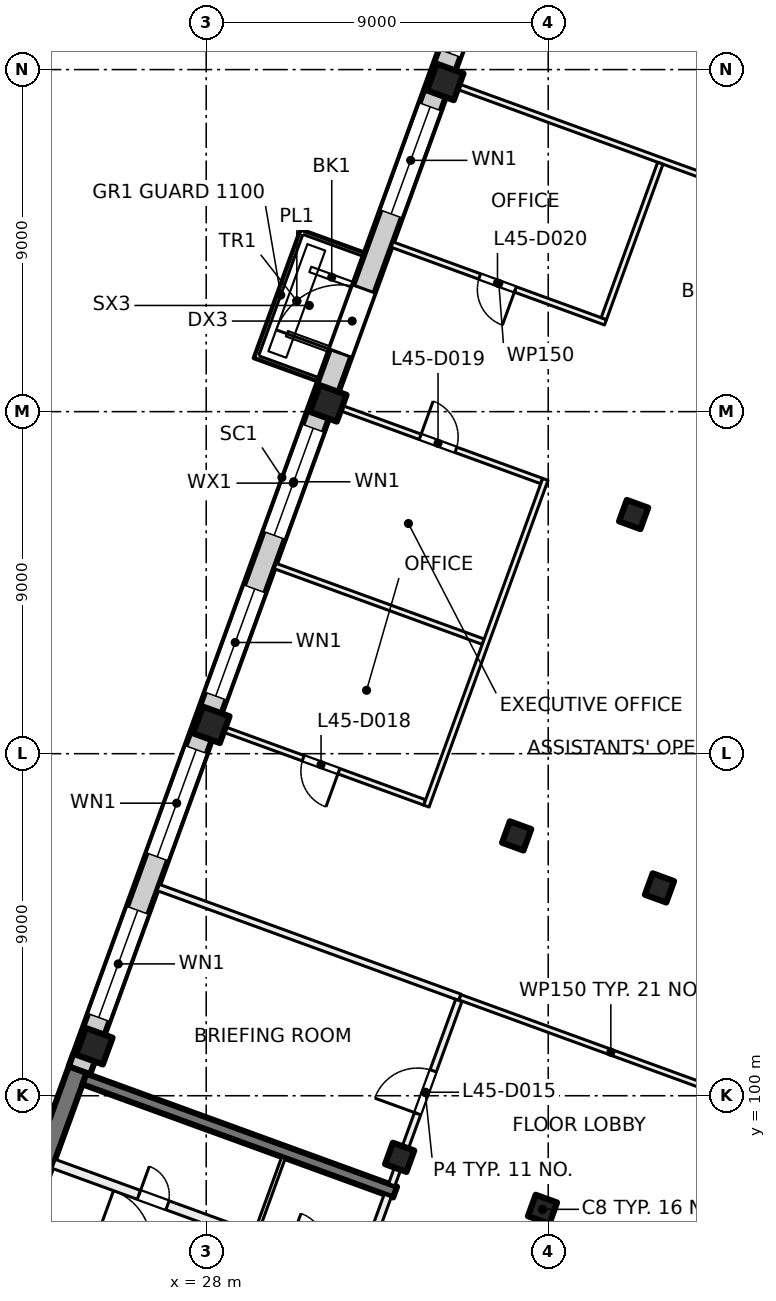
"""IFC4 building model, lengths in metres.
Left out: names, types, materials, properties, quantities, classifications, styles, units other than length and angle.
Written with IfcOpenShell. Run it as: python <this file> out.ifc"""

import sys

from ifc_helpers import new_model, si_unit, direction, frame, frame_2d, origin, origin_2d, place, context, subcontext, project, spatial, rectangle, extrude, element, fill, save


model = new_model("IFC4")
c1 = context("Model", 3, precision=1e-05, world=origin(), true_north=direction((0.0, 1.0)))
c2 = subcontext(c1, "Body", "Model", "MODEL_VIEW")
j1 = project(units=[si_unit("LENGTHUNIT", "METRE"), si_unit("PLANEANGLEUNIT", "RADIAN")], contexts=[c1])
p1 = place(None, origin())
s1 = spatial("IfcSite", under=j1, at=p1, CompositionType="ELEMENT")
p2 = place(p1, origin())
s2 = spatial("IfcBuilding", under=s1, at=p2, CompositionType="ELEMENT")
p3 = place(p2, frame((0.0, 0.0, 192.0)))
s3 = spatial("IfcBuildingStorey", under=s2, at=p3, CompositionType="ELEMENT", Elevation=192.0)
for number, where, z_axis, x_axis in (
    (1, (39.927, 105.468, 0.0), (0.0, 0.0, 1.0), (-0.342, -0.94, 0.0)),
    (2, (36.849, 97.011, 0.0), (0.0, 0.0, 1.0), (-0.342, -0.94, 0.0)),
    (3, (39.247, 115.293, 0.0), (0.0, 0.0, 1.0), (-0.342, -0.94, 0.0)),
    (4, (36.169, 106.836, 0.0), (0.0, 0.0, 1.0), (-0.342, -0.94, 0.0)),
    (5, (33.091, 98.379, 0.0), (0.0, 0.0, 1.0), (-0.342, -0.94, 0.0)),
):
    element("IfcColumn", number, at=place(p3, frame(where, z_axis=z_axis, x_axis=x_axis)), inside=s3, PredefinedType="COLUMN", context=c2, shape_type="SweptSolid", body=[
        extrude(rectangle(XDim=0.6, YDim=0.6, at=origin_2d()), origin(), (0.0, 0.0, 1.0), 4.0),
    ])
for number, where, z_axis, x_axis in (
    (6, (34.291, 126.675, 0.0), (0.0, 0.0, 1.0), (-0.342, -0.94, 0.0)),
    (7, (31.212, 118.218, 0.0), (0.0, 0.0, 1.0), (-0.342, -0.94, 0.0)),
    (8, (28.134, 109.76, 0.0), (0.0, 0.0, 1.0), (-0.342, -0.94, 0.0)),
    (9, (25.056, 101.303, 0.0), (0.0, 0.0, 1.0), (-0.342, -0.94, 0.0)),
):
    element("IfcColumn", number, at=place(p3, frame(where, z_axis=z_axis, x_axis=x_axis)), inside=s3, PredefinedType="COLUMN", context=c2, shape_type="SweptSolid", body=[
        extrude(rectangle(XDim=0.75, YDim=0.75, at=origin_2d()), origin(), (0.0, 0.0, 1.0), 4.0),
    ])
p4 = place(p3, frame((21.67, 92.585, 0.0), z_axis=(0.0, 0.0, 1.0), x_axis=(0.342035714298, 0.93968695327, 0.0)))
e10 = element("IfcWall", 10, at=p4, inside=s3, PredefinedType="SHEAR", context=c2, shape_type="SweptSolid", body=[
    extrude(rectangle(XDim=8.975, YDim=0.5, at=frame_2d((4.488, 0.0))), origin(), (0.0, 0.0, 1.0), 4.0),
])
p5 = place(p3, frame((32.971, 97.465, 0.0), z_axis=(0.0, 0.0, 1.0), x_axis=(-0.939695066972, 0.34201342241, 0.0)))
e11 = element("IfcWall", 11, at=p5, inside=s3, PredefinedType="SHEAR", context=c2, shape_type="SweptSolid", body=[
    extrude(rectangle(XDim=8.7, YDim=0.3, at=frame_2d((4.35, 0.0))), origin(), (0.0, 0.0, 1.0), 4.0),
])
p6 = place(p3, frame((24.666, 100.669, 0.0), z_axis=(0.0, 0.0, 1.0), x_axis=(0.34201964167, 0.939692803373, 0.0)))
e12 = element("IfcWall", 12, at=p6, inside=s3, PredefinedType="SOLIDWALL", context=c2, shape_type="SweptSolid", body=[
    extrude(rectangle(XDim=32.884, YDim=0.6, at=frame_2d((16.442, 0.0))), origin(), (0.0, 0.0, 1.0), 3.625),
])
p7 = place(p6, frame((1.48, 0.0, 0.9)))
e13 = element("IfcOpeningElement", 13, at=p7, cuts=e12, PredefinedType="OPENING", context=c2, shape_type="SweptSolid", body=[
    extrude(rectangle(XDim=3.0, YDim=2.4, at=frame_2d((1.5, 1.2))), frame((0.0, 0.31, 0.0), z_axis=(0.0, -1.0, 0.0), x_axis=(1.0, 0.0, 0.0)), (0.0, 0.0, 1.0), 0.62),
])
p8 = place(p6, frame((5.98, 0.0, 0.9)))
e14 = element("IfcOpeningElement", 14, at=p8, cuts=e12, PredefinedType="OPENING", context=c2, shape_type="SweptSolid", body=[
    extrude(rectangle(XDim=3.0, YDim=2.4, at=frame_2d((1.5, 1.2))), frame((0.0, 0.31, 0.0), z_axis=(0.0, -1.0, 0.0), x_axis=(1.0, 0.0, 0.0)), (0.0, 0.0, 1.0), 0.62),
])
p9 = place(p6, frame((10.48, 0.0, 0.9)))
e15 = element("IfcOpeningElement", 15, at=p9, cuts=e12, PredefinedType="OPENING", context=c2, shape_type="SweptSolid", body=[
    extrude(rectangle(XDim=3.0, YDim=2.4, at=frame_2d((1.5, 1.2))), frame((0.0, 0.31, 0.0), z_axis=(0.0, -1.0, 0.0), x_axis=(1.0, 0.0, 0.0)), (0.0, 0.0, 1.0), 0.62),
])
p10 = place(p6, frame((14.98, 0.0, 0.9)))
e16 = element("IfcOpeningElement", 16, at=p10, cuts=e12, PredefinedType="OPENING", context=c2, shape_type="SweptSolid", body=[
    extrude(rectangle(XDim=3.0, YDim=2.4, at=frame_2d((1.5, 1.2))), frame((0.0, 0.31, 0.0), z_axis=(0.0, -1.0, 0.0), x_axis=(1.0, 0.0, 0.0)), (0.0, 0.0, 1.0), 0.62),
])
p11 = place(p6, frame((20.08, 0.0, 0.0)))
e17 = element("IfcOpeningElement", 17, at=p11, cuts=e12, PredefinedType="OPENING", context=c2, shape_type="SweptSolid", body=[
    extrude(rectangle(XDim=1.8, YDim=2.4, at=frame_2d((0.9, 1.2))), frame((0.0, 0.31, 0.0), z_axis=(0.0, -1.0, 0.0), x_axis=(1.0, 0.0, 0.0)), (0.0, 0.0, 1.0), 0.62),
])
p12 = place(p6, frame((23.98, 0.0, 0.9)))
e18 = element("IfcOpeningElement", 18, at=p12, cuts=e12, PredefinedType="OPENING", context=c2, shape_type="SweptSolid", body=[
    extrude(rectangle(XDim=3.0, YDim=2.4, at=frame_2d((1.5, 1.2))), frame((0.0, 0.31, 0.0), z_axis=(0.0, -1.0, 0.0), x_axis=(1.0, 0.0, 0.0)), (0.0, 0.0, 1.0), 0.62),
])
p13 = place(p6, frame((28.48, 0.0, 0.9)))
e19 = element("IfcOpeningElement", 19, at=p13, cuts=e12, PredefinedType="OPENING", context=c2, shape_type="SweptSolid", body=[
    extrude(rectangle(XDim=3.0, YDim=2.4, at=frame_2d((1.5, 1.2))), frame((0.0, 0.31, 0.0), z_axis=(0.0, -1.0, 0.0), x_axis=(1.0, 0.0, 0.0)), (0.0, 0.0, 1.0), 0.62),
])
p14 = place(p3, frame((31.427, 93.663, 0.0), z_axis=(0.0, 0.0, 1.0), x_axis=(0.342030870568, 0.93968871632, 0.0)))
e20 = element("IfcWall", 20, at=p14, inside=s3, PredefinedType="PARTITIONING", context=c2, shape_type="SweptSolid", body=[
    extrude(rectangle(XDim=3.95, YDim=0.2, at=frame_2d((1.975, 0.0))), origin(), (0.0, 0.0, 1.0), 3.625),
])
p15 = place(p14, frame((0.3, 0.0, 0.0)))
e21 = element("IfcOpeningElement", 21, at=p15, cuts=e20, PredefinedType="OPENING", context=c2, shape_type="SweptSolid", body=[
    extrude(rectangle(XDim=1.2, YDim=2.1, at=frame_2d((0.6, 1.05))), frame((0.0, 0.11, 0.0), z_axis=(0.0, -1.0, 0.0), x_axis=(1.0, 0.0, 0.0)), (0.0, 0.0, 1.0), 0.22),
])
p16 = place(p3, frame((23.427, 96.682, 0.0), z_axis=(0.0, 0.0, 1.0), x_axis=(0.939690465531, -0.342026064782, 0.0)))
e22 = element("IfcWall", 22, at=p16, inside=s3, PredefinedType="PARTITIONING", context=c2, shape_type="SweptSolid", body=[
    extrude(rectangle(XDim=8.45, YDim=0.2, at=frame_2d((4.225, 0.0))), origin(), (0.0, 0.0, 1.0), 3.625),
])
p17 = place(p16, frame((1.725, 0.0, 0.0)))
e23 = element("IfcOpeningElement", 23, at=p17, cuts=e22, PredefinedType="OPENING", context=c2, shape_type="SweptSolid", body=[
    extrude(rectangle(XDim=1.5, YDim=2.1, at=frame_2d((0.75, 1.05))), frame((0.0, 0.11, 0.0), z_axis=(0.0, -1.0, 0.0), x_axis=(1.0, 0.0, 0.0)), (0.0, 0.0, 1.0), 0.22),
])
p18 = place(p3, frame((23.983, 98.208, 0.0), z_axis=(0.0, 0.0, 1.0), x_axis=(0.939699751196, -0.342000552051, 0.0)))
e24 = element("IfcWall", 24, at=p18, inside=s3, PredefinedType="PARTITIONING", context=c2, shape_type="SweptSolid", body=[
    extrude(rectangle(XDim=8.45, YDim=0.25, at=frame_2d((4.225, 0.0))), origin(), (0.0, 0.0, 1.0), 3.625),
])
p19 = place(p18, frame((6.565, 0.0, 0.0)))
e25 = element("IfcOpeningElement", 25, at=p19, cuts=e24, PredefinedType="OPENING", context=c2, shape_type="SweptSolid", body=[
    extrude(rectangle(XDim=1.0, YDim=2.1, at=frame_2d((0.5, 1.05))), frame((0.0, 0.135, 0.0), z_axis=(0.0, -1.0, 0.0), x_axis=(1.0, 0.0, 0.0)), (0.0, 0.0, 1.0), 0.27),
])
p20 = place(p18, frame((2.39, 0.0, 0.0)))
e26 = element("IfcOpeningElement", 26, at=p20, cuts=e24, PredefinedType="OPENING", context=c2, shape_type="SweptSolid", body=[
    extrude(rectangle(XDim=0.8, YDim=2.1, at=frame_2d((0.4, 1.05))), frame((0.0, 0.135, 0.0), z_axis=(0.0, -1.0, 0.0), x_axis=(1.0, 0.0, 0.0)), (0.0, 0.0, 1.0), 0.27),
])
p21 = place(p3, frame((29.316, 96.4, 0.0), z_axis=(0.0, 0.0, 1.0), x_axis=(0.342023078919, 0.939691552312, 0.0)))
e27 = element("IfcWall", 27, at=p21, inside=s3, PredefinedType="PARTITIONING", context=c2, shape_type="SweptSolid", body=[
    extrude(rectangle(XDim=2.1, YDim=0.1, at=frame_2d((1.05, 0.0))), origin(), (0.0, 0.0, 1.0), 3.625),
])
p22 = place(p3, frame((26.736, 105.48, 0.0), z_axis=(0.0, 0.0, 1.0), x_axis=(0.939706509432, -0.341981982173, 0.0)))
e28 = element("IfcWall", 28, at=p22, inside=s3, PredefinedType="PARTITIONING", context=c2, shape_type="SweptSolid", body=[
    extrude(rectangle(XDim=8.45, YDim=0.175, at=frame_2d((4.225, 0.0))), origin(), (0.0, 0.0, 1.0), 3.625),
])
p23 = place(p3, frame((29.814, 113.938, 0.0), z_axis=(0.0, 0.0, 1.0), x_axis=(0.939738354986, -0.341894463495, 0.0)))
e29 = element("IfcWall", 29, at=p23, inside=s3, PredefinedType="PARTITIONING", context=c2, shape_type="SweptSolid", body=[
    extrude(rectangle(XDim=5.826, YDim=0.15, at=frame_2d((2.913, 0.0))), origin(), (0.0, 0.0, 1.0), 3.625),
])
p24 = place(p3, frame((31.353, 118.166, 0.0), z_axis=(0.0, 0.0, 1.0), x_axis=(0.939733456466, -0.341907927371, 0.0)))
e30 = element("IfcWall", 30, at=p24, inside=s3, PredefinedType="PARTITIONING", context=c2, shape_type="SweptSolid", body=[
    extrude(rectangle(XDim=5.826, YDim=0.15, at=frame_2d((2.913, 0.0))), origin(), (0.0, 0.0, 1.0), 3.625),
])
p25 = place(p24, frame((2.423, 0.0, 0.0)))
e31 = element("IfcOpeningElement", 31, at=p25, cuts=e30, PredefinedType="OPENING", context=c2, shape_type="SweptSolid", body=[
    extrude(rectangle(XDim=1.0, YDim=2.1, at=frame_2d((0.5, 1.05))), frame((0.0, 0.085, 0.0), z_axis=(0.0, -1.0, 0.0), x_axis=(1.0, 0.0, 0.0)), (0.0, 0.0, 1.0), 0.17),
])
p26 = place(p3, frame((33.749, 107.717, 0.0), z_axis=(0.0, 0.0, 1.0), x_axis=(-0.939718757431, 0.341948324943, 0.0)))
e32 = element("IfcWall", 32, at=p26, inside=s3, PredefinedType="PARTITIONING", context=c2, shape_type="SweptSolid", body=[
    extrude(rectangle(XDim=5.825, YDim=0.15, at=frame_2d((2.913, 0.0))), origin(), (0.0, 0.0, 1.0), 3.625),
])
p27 = place(p26, frame((2.403, 0.0, 0.0)))
e33 = element("IfcOpeningElement", 33, at=p27, cuts=e32, PredefinedType="OPENING", context=c2, shape_type="SweptSolid", body=[
    extrude(rectangle(XDim=1.0, YDim=2.1, at=frame_2d((0.5, 1.05))), frame((0.0, 0.085, 0.0), z_axis=(0.0, -1.0, 0.0), x_axis=(1.0, 0.0, 0.0)), (0.0, 0.0, 1.0), 0.17),
])
p28 = place(p3, frame((36.924, 116.218, 0.0), z_axis=(0.0, 0.0, 1.0), x_axis=(-0.342220796767, -0.939619564643, 0.0)))
e34 = element("IfcWall", 34, at=p28, inside=s3, PredefinedType="PARTITIONING", context=c2, shape_type="SweptSolid", body=[
    extrude(rectangle(XDim=9.149, YDim=0.15, at=frame_2d((4.575, 0.0))), origin(), (0.0, 0.0, 1.0), 3.625),
])
p29 = place(p3, frame((34.431, 126.624, 0.0), z_axis=(0.0, 0.0, 1.0), x_axis=(0.939703144457, -0.341991228392, 0.0)))
e35 = element("IfcWall", 35, at=p29, inside=s3, PredefinedType="PARTITIONING", context=c2, shape_type="SweptSolid", body=[
    extrude(rectangle(XDim=12.401, YDim=0.15, at=frame_2d((6.2, 0.0))), origin(), (0.0, 0.0, 1.0), 3.625),
])
p30 = place(p3, frame((32.881, 97.657, 0.0), z_axis=(0.0, 0.0, 1.0), x_axis=(0.342058204353, 0.939678766832, 0.0)))
e36 = element("IfcWall", 36, at=p30, inside=s3, PredefinedType="PARTITIONING", context=c2, shape_type="SweptSolid", body=[
    extrude(rectangle(XDim=5.163, YDim=0.175, at=frame_2d((2.581, 0.0))), origin(), (0.0, 0.0, 1.0), 3.625),
])
p31 = place(p30, frame((1.991, 0.0, 0.0)))
e37 = element("IfcOpeningElement", 37, at=p31, cuts=e36, PredefinedType="OPENING", context=c2, shape_type="SweptSolid", body=[
    extrude(rectangle(XDim=1.2, YDim=2.1, at=frame_2d((0.6, 1.05))), frame((0.0, 0.097, 0.0), z_axis=(0.0, -1.0, 0.0), x_axis=(1.0, 0.0, 0.0)), (0.0, 0.0, 1.0), 0.195),
])
p32 = place(p3, frame((34.677, 102.59, 0.0), z_axis=(0.0, 0.0, 1.0), x_axis=(0.939683705252, -0.342044637561, 0.0)))
e38 = element("IfcWall", 38, at=p32, inside=s3, PredefinedType="PARTITIONING", context=c2, shape_type="SweptSolid", body=[
    extrude(rectangle(XDim=8.45, YDim=0.15, at=frame_2d((4.225, 0.0))), origin(), (0.0, 0.0, 1.0), 3.625),
])
p33 = place(p3, frame((38.507, 120.351, 0.0), z_axis=(0.0, 0.0, 1.0), x_axis=(-0.939678850769, 0.342057973766, 0.0)))
e39 = element("IfcWall", 39, at=p33, inside=s3, PredefinedType="PARTITIONING", context=c2, shape_type="SweptSolid", body=[
    extrude(rectangle(XDim=5.975, YDim=0.15, at=frame_2d((2.988, 0.0))), origin(), (0.0, 0.0, 1.0), 3.625),
])
p34 = place(p33, frame((2.525, 0.0, 0.0)))
e40 = element("IfcOpeningElement", 40, at=p34, cuts=e39, PredefinedType="OPENING", context=c2, shape_type="SweptSolid", body=[
    extrude(rectangle(XDim=1.0, YDim=2.1, at=frame_2d((0.5, 1.05))), frame((0.0, 0.085, 0.0), z_axis=(0.0, -1.0, 0.0), x_axis=(1.0, 0.0, 0.0)), (0.0, 0.0, 1.0), 0.17),
])
p35 = place(p3, frame((39.95, 124.536, 0.0), z_axis=(0.0, 0.0, 1.0), x_axis=(-0.341783611499, -0.939778677621, 0.0)))
e41 = element("IfcWall", 41, at=p35, inside=s3, PredefinedType="PARTITIONING", context=c2, shape_type="SweptSolid", body=[
    extrude(rectangle(XDim=4.351, YDim=0.15, at=frame_2d((2.175, 0.0))), origin(), (0.0, 0.0, 1.0), 3.625),
])
p36 = place(p7, origin())
e42 = element("IfcWindow", 42, at=p36, inside=s3, PartitioningType="SINGLE_PANEL", PredefinedType="WINDOW", context=c2, shape_type="SweptSolid", body=[
    extrude(rectangle(XDim=3.0, YDim=2.4, at=frame_2d((1.5, 1.2))), frame((0.0, 0.03, 0.0), z_axis=(0.0, -1.0, 0.0), x_axis=(1.0, 0.0, 0.0)), (0.0, 0.0, 1.0), 0.06),
])
fill(e13, e42)
p37 = place(p8, origin())
e43 = element("IfcWindow", 43, at=p37, inside=s3, PartitioningType="SINGLE_PANEL", PredefinedType="WINDOW", context=c2, shape_type="SweptSolid", body=[
    extrude(rectangle(XDim=3.0, YDim=2.4, at=frame_2d((1.5, 1.2))), frame((0.0, 0.03, 0.0), z_axis=(0.0, -1.0, 0.0), x_axis=(1.0, 0.0, 0.0)), (0.0, 0.0, 1.0), 0.06),
])
fill(e14, e43)
p38 = place(p9, origin())
e44 = element("IfcWindow", 44, at=p38, inside=s3, PartitioningType="SINGLE_PANEL", PredefinedType="WINDOW", context=c2, shape_type="SweptSolid", body=[
    extrude(rectangle(XDim=3.0, YDim=2.4, at=frame_2d((1.5, 1.2))), frame((0.0, 0.03, 0.0), z_axis=(0.0, -1.0, 0.0), x_axis=(1.0, 0.0, 0.0)), (0.0, 0.0, 1.0), 0.06),
])
fill(e15, e44)
p39 = place(p10, origin())
e45 = element("IfcWindow", 45, at=p39, inside=s3, PartitioningType="SINGLE_PANEL", PredefinedType="WINDOW", context=c2, shape_type="SweptSolid", body=[
    extrude(rectangle(XDim=3.0, YDim=2.4, at=frame_2d((1.5, 1.2))), frame((0.0, 0.03, 0.0), z_axis=(0.0, -1.0, 0.0), x_axis=(1.0, 0.0, 0.0)), (0.0, 0.0, 1.0), 0.06),
])
fill(e16, e45)
p40 = place(p11, origin())
e46 = element("IfcDoor", 46, at=p40, inside=s3, OperationType="DOUBLE_DOOR_SINGLE_SWING", PredefinedType="DOOR", context=c2, shape_type="SweptSolid", body=[
    extrude(rectangle(XDim=1.8, YDim=2.4, at=frame_2d((0.9, 1.2))), frame((0.0, 0.025, 0.0), z_axis=(0.0, -1.0, 0.0), x_axis=(1.0, 0.0, 0.0)), (0.0, 0.0, 1.0), 0.05),
])
fill(e17, e46)
p41 = place(p12, origin())
e47 = element("IfcWindow", 47, at=p41, inside=s3, PartitioningType="SINGLE_PANEL", PredefinedType="WINDOW", context=c2, shape_type="SweptSolid", body=[
    extrude(rectangle(XDim=3.0, YDim=2.4, at=frame_2d((1.5, 1.2))), frame((0.0, 0.03, 0.0), z_axis=(0.0, -1.0, 0.0), x_axis=(1.0, 0.0, 0.0)), (0.0, 0.0, 1.0), 0.06),
])
fill(e18, e47)
p42 = place(p13, origin())
e48 = element("IfcWindow", 48, at=p42, inside=s3, PartitioningType="SINGLE_PANEL", PredefinedType="WINDOW", context=c2, shape_type="SweptSolid", body=[
    extrude(rectangle(XDim=3.0, YDim=2.4, at=frame_2d((1.5, 1.2))), frame((0.0, 0.03, 0.0), z_axis=(0.0, -1.0, 0.0), x_axis=(1.0, 0.0, 0.0)), (0.0, 0.0, 1.0), 0.06),
])
fill(e19, e48)
p43 = place(p20, origin())
e49 = element("IfcDoor", 49, at=p43, inside=s3, OperationType="SINGLE_SWING_RIGHT", PredefinedType="DOOR", context=c2, shape_type="SweptSolid", body=[
    extrude(rectangle(XDim=0.8, YDim=2.1, at=frame_2d((0.4, 1.05))), frame((0.0, 0.025, 0.0), z_axis=(0.0, -1.0, 0.0), x_axis=(1.0, 0.0, 0.0)), (0.0, 0.0, 1.0), 0.05),
])
fill(e26, e49)
p44 = place(p31, origin())
e50 = element("IfcDoor", 50, at=p44, inside=s3, OperationType="DOUBLE_DOOR_SINGLE_SWING", PredefinedType="DOOR", context=c2, shape_type="SweptSolid", body=[
    extrude(rectangle(XDim=1.2, YDim=2.1, at=frame_2d((0.6, 1.05))), frame((0.0, 0.025, 0.0), z_axis=(0.0, -1.0, 0.0), x_axis=(1.0, 0.0, 0.0)), (0.0, 0.0, 1.0), 0.05),
])
fill(e37, e50)
p45 = place(p27, origin())
e51 = element("IfcDoor", 51, at=p45, inside=s3, OperationType="SINGLE_SWING_LEFT", PredefinedType="DOOR", context=c2, shape_type="SweptSolid", body=[
    extrude(rectangle(XDim=1.0, YDim=2.1, at=frame_2d((0.5, 1.05))), frame((0.0, 0.025, 0.0), z_axis=(0.0, -1.0, 0.0), x_axis=(1.0, 0.0, 0.0)), (0.0, 0.0, 1.0), 0.05),
])
fill(e33, e51)
p46 = place(p25, origin())
e52 = element("IfcDoor", 52, at=p46, inside=s3, OperationType="SINGLE_SWING_LEFT", PredefinedType="DOOR", context=c2, shape_type="SweptSolid", body=[
    extrude(rectangle(XDim=1.0, YDim=2.1, at=frame_2d((0.5, 1.05))), frame((0.0, 0.025, 0.0), z_axis=(0.0, -1.0, 0.0), x_axis=(1.0, 0.0, 0.0)), (0.0, 0.0, 1.0), 0.05),
])
fill(e31, e52)
p47 = place(p34, origin())
e53 = element("IfcDoor", 53, at=p47, inside=s3, OperationType="SINGLE_SWING_LEFT", PredefinedType="DOOR", context=c2, shape_type="SweptSolid", body=[
    extrude(rectangle(XDim=1.0, YDim=2.1, at=frame_2d((0.5, 1.05))), frame((0.0, 0.025, 0.0), z_axis=(0.0, -1.0, 0.0), x_axis=(1.0, 0.0, 0.0)), (0.0, 0.0, 1.0), 0.05),
])
fill(e40, e53)
save(model, sys.argv[1])
